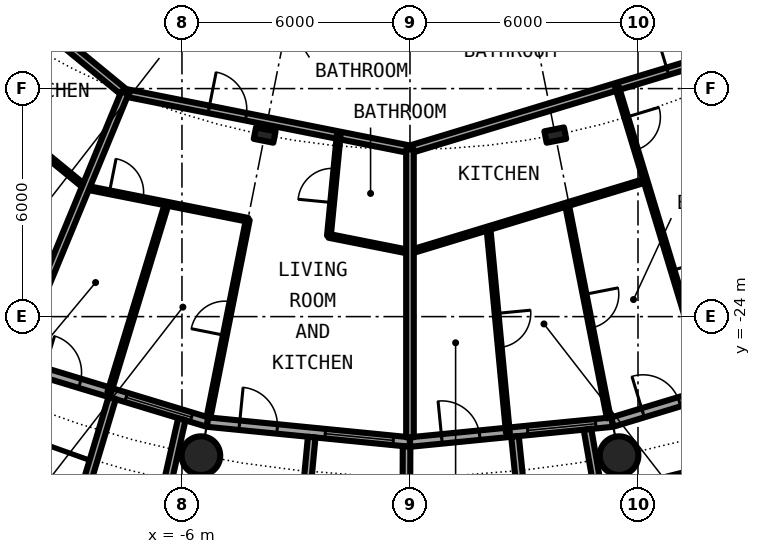
"""IFC4 building model, lengths in metres.
Left out: names, types, materials, properties, quantities, classifications, styles, units other than length and angle.
Written with IfcOpenShell. Run it as: python <this file> out.ifc"""

import sys

from ifc_helpers import new_model, si_unit, direction, frame, frame_2d, origin, origin_2d, place, context, subcontext, project, spatial, rectangle, hollow_circle, i_section, extrude, element, fill, save


model = new_model("IFC4")
c1 = context("Model", 3, precision=1e-05, world=origin(), true_north=direction((0.0, 1.0)))
c2 = subcontext(c1, "Body", "Model", "MODEL_VIEW")
j1 = project(units=[si_unit("LENGTHUNIT", "METRE"), si_unit("PLANEANGLEUNIT", "RADIAN")], contexts=[c1])
p1 = place(None, origin())
s1 = spatial("IfcSite", under=j1, at=p1, CompositionType="ELEMENT")
p2 = place(p1, origin())
s2 = spatial("IfcBuilding", under=s1, at=p2, CompositionType="ELEMENT")
p3 = place(p2, frame((0.0, 0.0, 69.7)))
s3 = spatial("IfcBuildingStorey", under=s2, at=p3, CompositionType="ELEMENT", Elevation=69.7)
for number, where, z_axis, x_axis in (
    (1, (-5.501, -27.658, 0.0), (0.0, 0.0, 1.0), (1.0, 0.0, 0.0)),
    (2, (5.501, -27.658, 0.0), (0.0, 0.0, 1.0), (1.0, 0.0, 0.0)),
):
    element("IfcColumn", number, at=place(p3, frame(where, z_axis=z_axis, x_axis=x_axis)), inside=s3, PredefinedType="COLUMN", context=c2, shape_type="SweptSolid", body=[
        extrude(hollow_circle(Radius=0.508, WallThickness=0.04, at=origin_2d()), origin(), (0.0, 0.0, 1.0), 3.05),
    ])
for number, where, z_axis, x_axis in (
    (3, (-3.824, -19.223, 0.0), (0.0, 0.0, 1.0), (-0.195, -0.981, 0.0)),
    (4, (3.824, -19.223, 0.0), (0.0, 0.0, 1.0), (0.195, -0.981, 0.0)),
):
    element("IfcColumn", number, at=place(p3, frame(where, z_axis=z_axis, x_axis=x_axis)), inside=s3, PredefinedType="COLUMN", context=c2, shape_type="SweptSolid", body=[
        extrude(i_section(OverallWidth=0.306, OverallDepth=0.524, WebThickness=0.021, FlangeThickness=0.04, FilletRadius=0.027, at=origin_2d()), origin(), (0.0, 0.0, 1.0), 3.05),
    ])
p4 = place(p3, frame((-10.447, -25.222, 0.0), z_axis=(0.0, 0.0, 1.0), x_axis=(0.956965678721, -0.290201119486, 0.0)))
e5 = element("IfcWall", 5, at=p4, inside=s3, PredefinedType="SOLIDWALL", context=c2, shape_type="SweptSolid", body=[
    extrude(rectangle(XDim=5.351, YDim=0.25, at=frame_2d((2.676, 0.0))), origin(), (0.0, 0.0, 1.0), 2.7),
])
p5 = place(p4, frame((0.841, 0.0, 0.0)))
e6 = element("IfcOpeningElement", 6, at=p5, cuts=e5, PredefinedType="OPENING", context=c2, shape_type="SweptSolid", body=[
    extrude(rectangle(XDim=1.0, YDim=2.2, at=frame_2d((0.5, 1.1))), frame((0.0, 0.135, 0.0), z_axis=(0.0, -1.0, 0.0), x_axis=(1.0, 0.0, 0.0)), (0.0, 0.0, 1.0), 0.27),
])
p6 = place(p4, frame((3.111, 0.0, 0.3)))
e7 = element("IfcOpeningElement", 7, at=p6, cuts=e5, PredefinedType="OPENING", context=c2, shape_type="SweptSolid", body=[
    extrude(rectangle(XDim=1.8, YDim=2.1, at=frame_2d((0.9, 1.05))), frame((0.0, 0.135, 0.0), z_axis=(0.0, -1.0, 0.0), x_axis=(1.0, 0.0, 0.0)), (0.0, 0.0, 1.0), 0.27),
])
p7 = place(p3, frame((-7.837, -26.144, -0.03), z_axis=(0.0, 0.0, 1.0), x_axis=(-0.287064767992, -0.957911174889, 0.0)))
e8 = element("IfcWall", 8, at=p7, inside=s3, PredefinedType="SOLIDWALL", context=c2, shape_type="SweptSolid", body=[
    extrude(rectangle(XDim=3.006, YDim=0.2, at=frame_2d((1.503, 0.0))), origin(), (0.0, 0.0, 1.0), 2.73),
])
p8 = place(p3, frame((-6.004, -26.7, -0.03), z_axis=(0.0, 0.0, 1.0), x_axis=(-0.219609259383, -0.975587911566, 0.0)))
e9 = element("IfcWall", 9, at=p8, inside=s3, PredefinedType="SOLIDWALL", context=c2, shape_type="SweptSolid", body=[
    extrude(rectangle(XDim=2.933, YDim=0.2, at=frame_2d((1.466, 0.0))), origin(), (0.0, 0.0, 1.0), 2.73),
])
p9 = place(p3, frame((-5.326, -26.775, 0.0), z_axis=(0.0, 0.0, 1.0), x_axis=(0.995173996315, -0.098126026407, 0.0)))
e10 = element("IfcWall", 10, at=p9, inside=s3, PredefinedType="SOLIDWALL", context=c2, shape_type="SweptSolid", body=[
    extrude(rectangle(XDim=5.352, YDim=0.25, at=frame_2d((2.676, 0.0))), origin(), (0.0, 0.0, 1.0), 2.7),
])
p10 = place(p9, frame((0.841, 0.0, 0.0)))
e11 = element("IfcOpeningElement", 11, at=p10, cuts=e10, PredefinedType="OPENING", context=c2, shape_type="SweptSolid", body=[
    extrude(rectangle(XDim=1.0, YDim=2.2, at=frame_2d((0.5, 1.1))), frame((0.0, 0.135, 0.0), z_axis=(0.0, -1.0, 0.0), x_axis=(1.0, 0.0, 0.0)), (0.0, 0.0, 1.0), 0.27),
])
p11 = place(p9, frame((3.111, 0.0, 0.3)))
e12 = element("IfcOpeningElement", 12, at=p11, cuts=e10, PredefinedType="OPENING", context=c2, shape_type="SweptSolid", body=[
    extrude(rectangle(XDim=1.8, YDim=2.1, at=frame_2d((0.9, 1.05))), frame((0.0, 0.135, 0.0), z_axis=(0.0, -1.0, 0.0), x_axis=(1.0, 0.0, 0.0)), (0.0, 0.0, 1.0), 0.27),
])
p12 = place(p3, frame((-2.586, -27.171, -0.03), z_axis=(0.0, 0.0, 1.0), x_axis=(-0.094548432284, -0.995520262954, 0.0)))
e13 = element("IfcWall", 13, at=p12, inside=s3, PredefinedType="SOLIDWALL", context=c2, shape_type="SweptSolid", body=[
    extrude(rectangle(XDim=3.006, YDim=0.2, at=frame_2d((1.503, 0.0))), origin(), (0.0, 0.0, 1.0), 2.73),
])
p13 = place(p3, frame((-0.09, -27.417, -0.03), z_axis=(0.0, 0.0, 1.0), x_axis=(-0.00347308367, -0.999993968827, 0.0)))
e14 = element("IfcWall", 14, at=p13, inside=s3, PredefinedType="SOLIDWALL", context=c2, shape_type="SweptSolid", body=[
    extrude(rectangle(XDim=2.882, YDim=0.2, at=frame_2d((1.441, 0.0))), origin(), (0.0, 0.0, 1.0), 2.73),
])
p14 = place(p3, frame((0.0, -27.3, 0.0), z_axis=(0.0, 0.0, 1.0), x_axis=(0.995173996315, 0.098126026407, 0.0)))
e15 = element("IfcWall", 15, at=p14, inside=s3, PredefinedType="SOLIDWALL", context=c2, shape_type="SweptSolid", body=[
    extrude(rectangle(XDim=5.352, YDim=0.25, at=frame_2d((2.676, 0.0))), origin(), (0.0, 0.0, 1.0), 2.7),
])
p15 = place(p14, frame((0.841, 0.0, 0.0)))
e16 = element("IfcOpeningElement", 16, at=p15, cuts=e15, PredefinedType="OPENING", context=c2, shape_type="SweptSolid", body=[
    extrude(rectangle(XDim=1.0, YDim=2.2, at=frame_2d((0.5, 1.1))), frame((0.0, 0.135, 0.0), z_axis=(0.0, -1.0, 0.0), x_axis=(1.0, 0.0, 0.0)), (0.0, 0.0, 1.0), 0.27),
])
p16 = place(p14, frame((3.111, 0.0, 0.3)))
e17 = element("IfcOpeningElement", 17, at=p16, cuts=e15, PredefinedType="OPENING", context=c2, shape_type="SweptSolid", body=[
    extrude(rectangle(XDim=1.8, YDim=2.1, at=frame_2d((0.9, 1.05))), frame((0.0, 0.135, 0.0), z_axis=(0.0, -1.0, 0.0), x_axis=(1.0, 0.0, 0.0)), (0.0, 0.0, 1.0), 0.27),
])
p17 = place(p3, frame((2.764, -27.153, -0.03), z_axis=(0.0, 0.0, 1.0), x_axis=(0.101505487237, -0.994834979311, 0.0)))
e18 = element("IfcWall", 18, at=p17, inside=s3, PredefinedType="SOLIDWALL", context=c2, shape_type="SweptSolid", body=[
    extrude(rectangle(XDim=3.007, YDim=0.2, at=frame_2d((1.503, 0.0))), origin(), (0.0, 0.0, 1.0), 2.73),
])
p18 = place(p3, frame((4.671, -26.966, -0.03), z_axis=(0.0, 0.0, 1.0), x_axis=(0.170539878907, -0.985350774954, 0.0)))
e19 = element("IfcWall", 19, at=p18, inside=s3, PredefinedType="SOLIDWALL", context=c2, shape_type="SweptSolid", body=[
    extrude(rectangle(XDim=2.932, YDim=0.2, at=frame_2d((1.466, 0.0))), origin(), (0.0, 0.0, 1.0), 2.73),
])
p19 = place(p3, frame((5.326, -26.775, 0.0), z_axis=(0.0, 0.0, 1.0), x_axis=(0.956965678721, 0.290201119486, 0.0)))
e20 = element("IfcWall", 20, at=p19, inside=s3, PredefinedType="SOLIDWALL", context=c2, shape_type="SweptSolid", body=[
    extrude(rectangle(XDim=5.351, YDim=0.25, at=frame_2d((2.676, 0.0))), origin(), (0.0, 0.0, 1.0), 2.7),
])
p20 = place(p19, frame((0.841, 0.0, 0.0)))
e21 = element("IfcOpeningElement", 21, at=p20, cuts=e20, PredefinedType="OPENING", context=c2, shape_type="SweptSolid", body=[
    extrude(rectangle(XDim=1.0, YDim=2.2, at=frame_2d((0.5, 1.1))), frame((0.0, 0.135, 0.0), z_axis=(0.0, -1.0, 0.0), x_axis=(1.0, 0.0, 0.0)), (0.0, 0.0, 1.0), 0.27),
])
p21 = place(p19, frame((3.111, 0.0, 0.3)))
e22 = element("IfcOpeningElement", 22, at=p21, cuts=e20, PredefinedType="OPENING", context=c2, shape_type="SweptSolid", body=[
    extrude(rectangle(XDim=1.8, YDim=2.1, at=frame_2d((0.9, 1.05))), frame((0.0, 0.135, 0.0), z_axis=(0.0, -1.0, 0.0), x_axis=(1.0, 0.0, 0.0)), (0.0, 0.0, 1.0), 0.27),
])
p22 = place(p3, frame((-8.536, -20.603, 0.0), z_axis=(0.0, 0.0, 1.0), x_axis=(0.980795826794, -0.195037294239, 0.0)))
e23 = element("IfcWall", 23, at=p22, inside=s3, PredefinedType="PARTITIONING", context=c2, shape_type="SweptSolid", body=[
    extrude(rectangle(XDim=4.352, YDim=0.1, at=frame_2d((2.176, 0.0))), origin(), (0.0, 0.0, 1.0), 2.7),
])
p23 = place(p22, frame((0.639, 0.0, 0.0)))
e24 = element("IfcOpeningElement", 24, at=p23, cuts=e23, PredefinedType="OPENING", context=c2, shape_type="SweptSolid", body=[
    extrude(rectangle(XDim=0.9, YDim=2.3, at=frame_2d((0.45, 1.15))), frame((0.0, 0.06, 0.0), z_axis=(0.0, -1.0, 0.0), x_axis=(1.0, 0.0, 0.0)), (0.0, 0.0, 1.0), 0.12),
])
p24 = place(p3, frame((-2.133, -21.876, 0.0), z_axis=(0.0, 0.0, 1.0), x_axis=(0.980804550577, -0.194993419292, 0.0)))
e25 = element("IfcWall", 25, at=p24, inside=s3, PredefinedType="PARTITIONING", context=c2, shape_type="SweptSolid", body=[
    extrude(rectangle(XDim=2.175, YDim=0.1, at=frame_2d((1.087, 0.0))), origin(), (0.0, 0.0, 1.0), 2.7),
])
p25 = place(p3, frame((-13.538, -16.496, 0.0), z_axis=(0.0, 0.0, 1.0), x_axis=(0.773000340237, -0.634405606843, 0.0)))
e26 = element("IfcWall", 26, at=p25, inside=s3, PredefinedType="PARTITIONING", context=c2, shape_type="SweptSolid", body=[
    extrude(rectangle(XDim=6.474, YDim=0.1, at=frame_2d((3.237, 0.0))), origin(), (0.0, 0.0, 1.0), 2.7),
])
p26 = place(p3, frame((0.0, -22.3, 0.0), z_axis=(0.0, 0.0, 1.0), x_axis=(0.956940987612, 0.290282528286, 0.0)))
e27 = element("IfcWall", 27, at=p26, inside=s3, PredefinedType="PARTITIONING", context=c2, shape_type="SweptSolid", body=[
    extrude(rectangle(XDim=6.477, YDim=0.1, at=frame_2d((3.238, 0.0))), origin(), (0.0, 0.0, 1.0), 2.7),
])
p27 = place(p3, frame((-7.501, -18.108, 0.0), z_axis=(0.0, 0.0, 1.0), x_axis=(0.980781515054, -0.195109250749, 0.0)))
e28 = element("IfcWall", 28, at=p27, inside=s3, PredefinedType="PARTITIONING", context=c2, shape_type="SweptSolid", body=[
    extrude(rectangle(XDim=7.648, YDim=0.2, at=frame_2d((3.824, 0.0))), origin(), (0.0, 0.0, 1.0), 2.38),
])
p28 = place(p27, frame((2.25, 0.0, 0.0)))
e29 = element("IfcOpeningElement", 29, at=p28, cuts=e28, PredefinedType="OPENING", context=c2, shape_type="SweptSolid", body=[
    extrude(rectangle(XDim=1.0, YDim=2.3, at=frame_2d((0.5, 1.15))), frame((0.0, 0.11, 0.0), z_axis=(0.0, -1.0, 0.0), x_axis=(1.0, 0.0, 0.0)), (0.0, 0.0, 1.0), 0.22),
])
p29 = place(p3, frame((-16.172, -10.99, 0.0), z_axis=(0.0, 0.0, 1.0), x_axis=(0.772669779479, -0.634808169355, 0.0)))
e30 = element("IfcWall", 30, at=p29, inside=s3, PredefinedType="PARTITIONING", context=c2, shape_type="SweptSolid", body=[
    extrude(rectangle(XDim=11.208, YDim=0.2, at=frame_2d((5.604, 0.0))), origin(), (0.0, 0.0, 1.0), 2.38),
])
p30 = place(p29, frame((3.135, 0.0, 0.0)))
e31 = element("IfcOpeningElement", 31, at=p30, cuts=e30, PredefinedType="OPENING", context=c2, shape_type="SweptSolid", body=[
    extrude(rectangle(XDim=1.0, YDim=2.3, at=frame_2d((0.5, 1.15))), frame((0.0, 0.11, 0.0), z_axis=(0.0, -1.0, 0.0), x_axis=(1.0, 0.0, 0.0)), (0.0, 0.0, 1.0), 0.22),
])
p31 = place(p3, frame((0.0, -19.6, 0.0), z_axis=(0.0, 0.0, 1.0), x_axis=(0.956932298225, 0.290311172044, 0.0)))
e32 = element("IfcWall", 32, at=p31, inside=s3, PredefinedType="PARTITIONING", context=c2, shape_type="SweptSolid", body=[
    extrude(rectangle(XDim=11.219, YDim=0.2, at=frame_2d((5.61, 0.0))), origin(), (0.0, 0.0, 1.0), 2.38),
])
p32 = place(p31, frame((7.086, 0.0, 0.0)))
e33 = element("IfcOpeningElement", 33, at=p32, cuts=e32, PredefinedType="OPENING", context=c2, shape_type="SweptSolid", body=[
    extrude(rectangle(XDim=1.0, YDim=2.3, at=frame_2d((0.5, 1.15))), frame((0.0, 0.11, 0.0), z_axis=(0.0, -1.0, 0.0), x_axis=(1.0, 0.0, 0.0)), (0.0, 0.0, 1.0), 0.22),
])
p33 = place(p3, frame((-10.399, -25.106, 0.0), z_axis=(0.0, 0.0, 1.0), x_axis=(0.382600411313, 0.923913916587, 0.0)))
e34 = element("IfcWall", 34, at=p33, inside=s3, PredefinedType="PARTITIONING", context=c2, shape_type="SweptSolid", body=[
    extrude(rectangle(XDim=7.574, YDim=0.2, at=frame_2d((3.787, 0.0))), origin(), (0.0, 0.0, 1.0), 2.7),
])
p34 = place(p3, frame((-7.913, -25.997, 0.0), z_axis=(0.0, 0.0, 1.0), x_axis=(0.291264462755, 0.956642573136, 0.0)))
e35 = element("IfcWall", 35, at=p34, inside=s3, PredefinedType="PARTITIONING", context=c2, shape_type="SweptSolid", body=[
    extrude(rectangle(XDim=5.195, YDim=0.1, at=frame_2d((2.598, 0.0))), origin(), (0.0, 0.0, 1.0), 2.7),
])
p35 = place(p3, frame((-5.302, -26.653, 0.0), z_axis=(0.0, 0.0, 1.0), x_axis=(0.195115793364, 0.980780213493, 0.0)))
e36 = element("IfcWall", 36, at=p35, inside=s3, PredefinedType="PARTITIONING", context=c2, shape_type="SweptSolid", body=[
    extrude(rectangle(XDim=5.304, YDim=0.1, at=frame_2d((2.652, 0.0))), origin(), (0.0, 0.0, 1.0), 2.7),
])
p36 = place(p35, frame((2.202, 0.0, 0.0)))
e37 = element("IfcOpeningElement", 37, at=p36, cuts=e36, PredefinedType="OPENING", context=c2, shape_type="SweptSolid", body=[
    extrude(rectangle(XDim=0.9, YDim=2.3, at=frame_2d((0.45, 1.15))), frame((0.0, 0.06, 0.0), z_axis=(0.0, -1.0, 0.0), x_axis=(1.0, 0.0, 0.0)), (0.0, 0.0, 1.0), 0.12),
])
p37 = place(p3, frame((-2.133, -21.876, 0.0), z_axis=(0.0, 0.0, 1.0), x_axis=(0.096960338807, 0.995288246036, 0.0)))
e38 = element("IfcWall", 38, at=p37, inside=s3, PredefinedType="PARTITIONING", context=c2, shape_type="SweptSolid", body=[
    extrude(rectangle(XDim=2.661, YDim=0.1, at=frame_2d((1.331, 0.0))), origin(), (0.0, 0.0, 1.0), 2.7),
])
p38 = place(p37, frame((0.881, 0.0, 0.0)))
e39 = element("IfcOpeningElement", 39, at=p38, cuts=e38, PredefinedType="OPENING", context=c2, shape_type="SweptSolid", body=[
    extrude(rectangle(XDim=0.9, YDim=2.3, at=frame_2d((0.45, 1.15))), frame((0.0, 0.06, 0.0), z_axis=(0.0, -1.0, 0.0), x_axis=(1.0, 0.0, 0.0)), (0.0, 0.0, 1.0), 0.12),
])
p39 = place(p3, frame((0.0, -27.175, 0.0), z_axis=(0.0, 0.0, 1.0), x_axis=(0.0, 1.0, 0.0)))
e40 = element("IfcWall", 40, at=p39, inside=s3, PredefinedType="PARTITIONING", context=c2, shape_type="SweptSolid", body=[
    extrude(rectangle(XDim=7.575, YDim=0.2, at=frame_2d((3.788, 0.0))), origin(), (0.0, 0.0, 1.0), 2.7),
])
p40 = place(p3, frame((2.065, -21.674, 0.0), z_axis=(0.0, 0.0, 1.0), x_axis=(0.094751520537, -0.99550095397, 0.0)))
e41 = element("IfcWall", 41, at=p40, inside=s3, PredefinedType="PARTITIONING", context=c2, shape_type="SweptSolid", body=[
    extrude(rectangle(XDim=5.403, YDim=0.1, at=frame_2d((2.702, 0.0))), origin(), (0.0, 0.0, 1.0), 2.7),
])
p41 = place(p40, frame((2.252, 0.0, 0.0)))
e42 = element("IfcOpeningElement", 42, at=p41, cuts=e41, PredefinedType="OPENING", context=c2, shape_type="SweptSolid", body=[
    extrude(rectangle(XDim=0.9, YDim=2.3, at=frame_2d((0.45, 1.15))), frame((0.0, 0.06, 0.0), z_axis=(0.0, -1.0, 0.0), x_axis=(1.0, 0.0, 0.0)), (0.0, 0.0, 1.0), 0.12),
])
p42 = place(p3, frame((4.13, -21.047, 0.0), z_axis=(0.0, 0.0, 1.0), x_axis=(0.192433779325, -0.981309961518, 0.0)))
e43 = element("IfcWall", 43, at=p42, inside=s3, PredefinedType="PARTITIONING", context=c2, shape_type="SweptSolid", body=[
    extrude(rectangle(XDim=5.727, YDim=0.1, at=frame_2d((2.863, 0.0))), origin(), (0.0, 0.0, 1.0), 2.7),
])
p43 = place(p42, frame((2.414, 0.0, 0.0)))
e44 = element("IfcOpeningElement", 44, at=p43, cuts=e43, PredefinedType="OPENING", context=c2, shape_type="SweptSolid", body=[
    extrude(rectangle(XDim=0.9, YDim=2.3, at=frame_2d((0.45, 1.15))), frame((0.0, 0.06, 0.0), z_axis=(0.0, -1.0, 0.0), x_axis=(1.0, 0.0, 0.0)), (0.0, 0.0, 1.0), 0.12),
])
p44 = place(p3, frame((5.445, -17.948, 0.0), z_axis=(0.0, 0.0, 1.0), x_axis=(0.290158700753, -0.956978541231, 0.0)))
e45 = element("IfcWall", 45, at=p44, inside=s3, PredefinedType="PARTITIONING", context=c2, shape_type="SweptSolid", body=[
    extrude(rectangle(XDim=8.419, YDim=0.1, at=frame_2d((4.209, 0.0))), origin(), (0.0, 0.0, 1.0), 2.7),
])
p45 = place(p44, frame((0.842, 0.0, 0.0)))
e46 = element("IfcOpeningElement", 46, at=p45, cuts=e45, PredefinedType="OPENING", context=c2, shape_type="SweptSolid", body=[
    extrude(rectangle(XDim=0.9, YDim=2.3, at=frame_2d((0.45, 1.15))), frame((0.0, 0.06, 0.0), z_axis=(0.0, -1.0, 0.0), x_axis=(1.0, 0.0, 0.0)), (0.0, 0.0, 1.0), 0.12),
])
p46 = place(p44, frame((5.052, 0.0, 0.0)))
e47 = element("IfcOpeningElement", 47, at=p46, cuts=e45, PredefinedType="OPENING", context=c2, shape_type="SweptSolid", body=[
    extrude(rectangle(XDim=0.9, YDim=2.3, at=frame_2d((0.45, 1.15))), frame((0.0, 0.06, 0.0), z_axis=(0.0, -1.0, 0.0), x_axis=(1.0, 0.0, 0.0)), (0.0, 0.0, 1.0), 0.12),
])
p47 = place(p5, origin())
e48 = element("IfcDoor", 48, at=p47, inside=s3, OperationType="SINGLE_SWING_LEFT", PredefinedType="DOOR", context=c2, shape_type="SweptSolid", body=[
    extrude(rectangle(XDim=1.0, YDim=2.2, at=frame_2d((0.5, 1.1))), frame((0.0, 0.025, 0.0), z_axis=(0.0, -1.0, 0.0), x_axis=(1.0, 0.0, 0.0)), (0.0, 0.0, 1.0), 0.05),
])
fill(e6, e48)
p48 = place(p6, origin())
e49 = element("IfcWindow", 49, at=p48, inside=s3, PartitioningType="SINGLE_PANEL", PredefinedType="WINDOW", context=c2, shape_type="SweptSolid", body=[
    extrude(rectangle(XDim=1.8, YDim=2.1, at=frame_2d((0.9, 1.05))), frame((0.0, 0.03, 0.0), z_axis=(0.0, -1.0, 0.0), x_axis=(1.0, 0.0, 0.0)), (0.0, 0.0, 1.0), 0.06),
])
fill(e7, e49)
p49 = place(p10, origin())
e50 = element("IfcDoor", 50, at=p49, inside=s3, OperationType="SINGLE_SWING_LEFT", PredefinedType="DOOR", context=c2, shape_type="SweptSolid", body=[
    extrude(rectangle(XDim=1.0, YDim=2.2, at=frame_2d((0.5, 1.1))), frame((0.0, 0.025, 0.0), z_axis=(0.0, -1.0, 0.0), x_axis=(1.0, 0.0, 0.0)), (0.0, 0.0, 1.0), 0.05),
])
fill(e11, e50)
p50 = place(p11, origin())
e51 = element("IfcWindow", 51, at=p50, inside=s3, PartitioningType="SINGLE_PANEL", PredefinedType="WINDOW", context=c2, shape_type="SweptSolid", body=[
    extrude(rectangle(XDim=1.8, YDim=2.1, at=frame_2d((0.9, 1.05))), frame((0.0, 0.03, 0.0), z_axis=(0.0, -1.0, 0.0), x_axis=(1.0, 0.0, 0.0)), (0.0, 0.0, 1.0), 0.06),
])
fill(e12, e51)
p51 = place(p15, origin())
e52 = element("IfcDoor", 52, at=p51, inside=s3, OperationType="SINGLE_SWING_LEFT", PredefinedType="DOOR", context=c2, shape_type="SweptSolid", body=[
    extrude(rectangle(XDim=1.0, YDim=2.2, at=frame_2d((0.5, 1.1))), frame((0.0, 0.025, 0.0), z_axis=(0.0, -1.0, 0.0), x_axis=(1.0, 0.0, 0.0)), (0.0, 0.0, 1.0), 0.05),
])
fill(e16, e52)
p52 = place(p16, origin())
e53 = element("IfcWindow", 53, at=p52, inside=s3, PartitioningType="SINGLE_PANEL", PredefinedType="WINDOW", context=c2, shape_type="SweptSolid", body=[
    extrude(rectangle(XDim=1.8, YDim=2.1, at=frame_2d((0.9, 1.05))), frame((0.0, 0.03, 0.0), z_axis=(0.0, -1.0, 0.0), x_axis=(1.0, 0.0, 0.0)), (0.0, 0.0, 1.0), 0.06),
])
fill(e17, e53)
p53 = place(p20, origin())
e54 = element("IfcDoor", 54, at=p53, inside=s3, OperationType="SINGLE_SWING_LEFT", PredefinedType="DOOR", context=c2, shape_type="SweptSolid", body=[
    extrude(rectangle(XDim=1.0, YDim=2.2, at=frame_2d((0.5, 1.1))), frame((0.0, 0.025, 0.0), z_axis=(0.0, -1.0, 0.0), x_axis=(1.0, 0.0, 0.0)), (0.0, 0.0, 1.0), 0.05),
])
fill(e21, e54)
p54 = place(p28, origin())
e55 = element("IfcDoor", 55, at=p54, inside=s3, OperationType="SINGLE_SWING_LEFT", PredefinedType="DOOR", context=c2, shape_type="SweptSolid", body=[
    extrude(rectangle(XDim=1.0, YDim=2.3, at=frame_2d((0.5, 1.15))), frame((0.0, 0.025, 0.0), z_axis=(0.0, -1.0, 0.0), x_axis=(1.0, 0.0, 0.0)), (0.0, 0.0, 1.0), 0.05),
])
fill(e29, e55)
p55 = place(p38, origin())
e56 = element("IfcDoor", 56, at=p55, inside=s3, OperationType="SINGLE_SWING_LEFT", PredefinedType="DOOR", context=c2, shape_type="SweptSolid", body=[
    extrude(rectangle(XDim=0.9, YDim=2.3, at=frame_2d((0.45, 1.15))), frame((0.0, 0.025, 0.0), z_axis=(0.0, -1.0, 0.0), x_axis=(1.0, 0.0, 0.0)), (0.0, 0.0, 1.0), 0.05),
])
fill(e39, e56)
p56 = place(p36, origin())
e57 = element("IfcDoor", 57, at=p56, inside=s3, OperationType="SINGLE_SWING_LEFT", PredefinedType="DOOR", context=c2, shape_type="SweptSolid", body=[
    extrude(rectangle(XDim=0.9, YDim=2.3, at=frame_2d((0.45, 1.15))), frame((0.0, 0.025, 0.0), z_axis=(0.0, -1.0, 0.0), x_axis=(1.0, 0.0, 0.0)), (0.0, 0.0, 1.0), 0.05),
])
fill(e37, e57)
p57 = place(p23, origin())
e58 = element("IfcDoor", 58, at=p57, inside=s3, OperationType="SINGLE_SWING_LEFT", PredefinedType="DOOR", context=c2, shape_type="SweptSolid", body=[
    extrude(rectangle(XDim=0.9, YDim=2.3, at=frame_2d((0.45, 1.15))), frame((0.0, 0.025, 0.0), z_axis=(0.0, -1.0, 0.0), x_axis=(1.0, 0.0, 0.0)), (0.0, 0.0, 1.0), 0.05),
])
fill(e24, e58)
p58 = place(p32, origin())
e59 = element("IfcDoor", 59, at=p58, inside=s3, OperationType="SINGLE_SWING_RIGHT", PredefinedType="DOOR", context=c2, shape_type="SweptSolid", body=[
    extrude(rectangle(XDim=1.0, YDim=2.3, at=frame_2d((0.5, 1.15))), frame((0.0, 0.025, 0.0), z_axis=(0.0, -1.0, 0.0), x_axis=(1.0, 0.0, 0.0)), (0.0, 0.0, 1.0), 0.05),
])
fill(e33, e59)
p59 = place(p45, origin())
e60 = element("IfcDoor", 60, at=p59, inside=s3, OperationType="SINGLE_SWING_LEFT", PredefinedType="DOOR", context=c2, shape_type="SweptSolid", body=[
    extrude(rectangle(XDim=0.9, YDim=2.3, at=frame_2d((0.45, 1.15))), frame((0.0, 0.025, 0.0), z_axis=(0.0, -1.0, 0.0), x_axis=(1.0, 0.0, 0.0)), (0.0, 0.0, 1.0), 0.05),
])
fill(e46, e60)
p60 = place(p46, origin())
e61 = element("IfcDoor", 61, at=p60, inside=s3, OperationType="SINGLE_SWING_RIGHT", PredefinedType="DOOR", context=c2, shape_type="SweptSolid", body=[
    extrude(rectangle(XDim=0.9, YDim=2.3, at=frame_2d((0.45, 1.15))), frame((0.0, 0.025, 0.0), z_axis=(0.0, -1.0, 0.0), x_axis=(1.0, 0.0, 0.0)), (0.0, 0.0, 1.0), 0.05),
])
fill(e47, e61)
p61 = place(p43, origin())
e62 = element("IfcDoor", 62, at=p61, inside=s3, OperationType="SINGLE_SWING_RIGHT", PredefinedType="DOOR", context=c2, shape_type="SweptSolid", body=[
    extrude(rectangle(XDim=0.9, YDim=2.3, at=frame_2d((0.45, 1.15))), frame((0.0, 0.025, 0.0), z_axis=(0.0, -1.0, 0.0), x_axis=(1.0, 0.0, 0.0)), (0.0, 0.0, 1.0), 0.05),
])
fill(e44, e62)
p62 = place(p41, origin())
e63 = element("IfcDoor", 63, at=p62, inside=s3, OperationType="SINGLE_SWING_LEFT", PredefinedType="DOOR", context=c2, shape_type="SweptSolid", body=[
    extrude(rectangle(XDim=0.9, YDim=2.3, at=frame_2d((0.45, 1.15))), frame((0.0, 0.025, 0.0), z_axis=(0.0, -1.0, 0.0), x_axis=(1.0, 0.0, 0.0)), (0.0, 0.0, 1.0), 0.05),
])
fill(e42, e63)
save(model, sys.argv[1])
